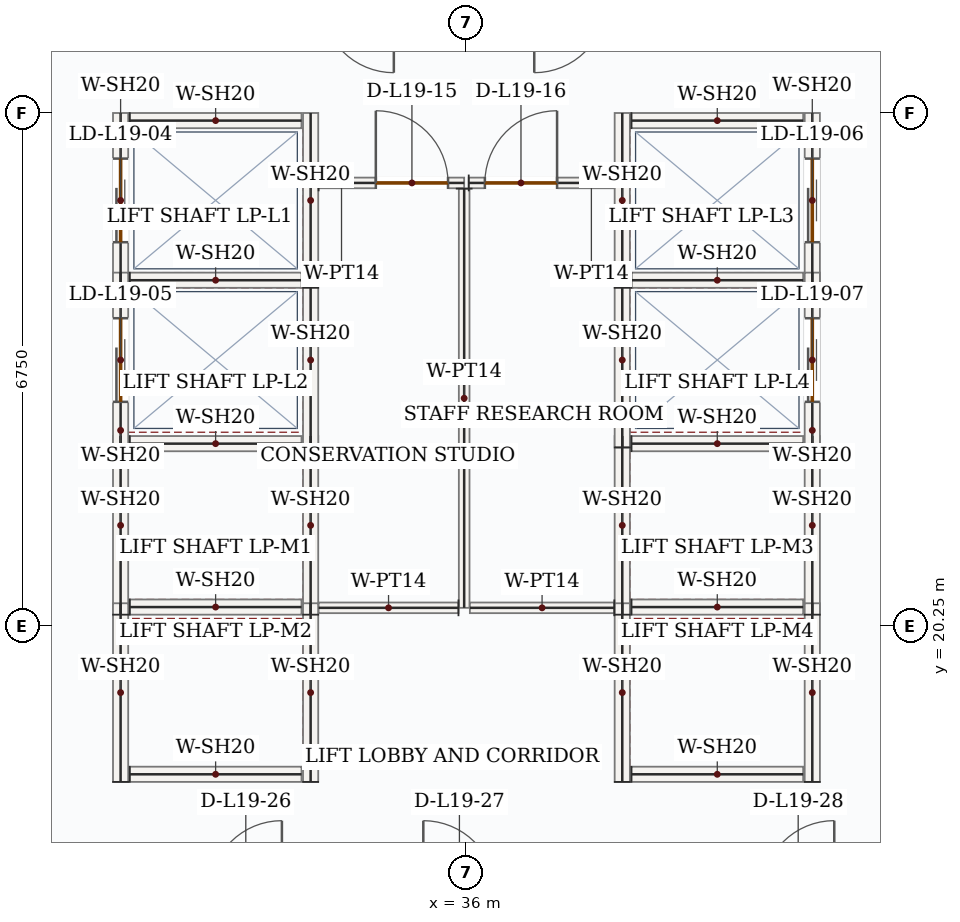
"""IFC4 building model, lengths in metres.
Left out: names, types, materials, properties, quantities, classifications, styles, units other than length and angle.
Written with IfcOpenShell. Run it as: python <this file> out.ifc"""

import sys

from ifc_helpers import new_model, si_unit, direction, frame, frame_2d, origin, place, context, subcontext, project, spatial, rectangle, extrude, source, transform, mapped, element, fill, save


model = new_model("IFC4")
c1 = context("Model", 3, precision=1e-05, world=origin(), true_north=direction((0.0, 1.0)))
c2 = subcontext(c1, "Body", "Model", "MODEL_VIEW")
j1 = project(units=[si_unit("LENGTHUNIT", "METRE"), si_unit("PLANEANGLEUNIT", "RADIAN")], contexts=[c1])
p1 = place(None, origin())
s1 = spatial("IfcSite", under=j1, at=p1, CompositionType="ELEMENT")
p2 = place(p1, origin())
s2 = spatial("IfcBuilding", under=s1, at=p2, CompositionType="ELEMENT")
p3 = place(p2, frame((0.0, 0.0, 87.9)))
s3 = spatial("IfcBuildingStorey", under=s2, at=p3, CompositionType="ELEMENT", Elevation=87.9)
m1 = source(origin(), c2, "Body", "SweptSolid", [
    extrude(rectangle(XDim=2.35, YDim=0.2, at=frame_2d((1.175, 0.0))), origin(), (0.0, 0.0, 1.0), 3.95),
])
for number, where, z_axis, x_axis in (
    (1, (31.45, 20.4, 0.0), (0.0, 0.0, 1.0), (0.0, 1.0, 0.0)),
    (2, (33.95, 20.4, 0.0), (0.0, 0.0, 1.0), (0.0, 1.0, 0.0)),
):
    element("IfcWall", number, at=place(p3, frame(where, z_axis=z_axis, x_axis=x_axis)), inside=s3, PredefinedType="SOLIDWALL", context=c2, shape_type="MappedRepresentation", body=[
        mapped(m1, transform((0.0, 0.0, 0.0), x_axis=(1.0, 0.0, 0.0), y_axis=(0.0, 1.0, 0.0), z_axis=(0.0, 0.0, 1.0), scale=1.0)),
    ])
m2 = source(origin(), c2, "Body", "SweptSolid", [
    extrude(rectangle(XDim=2.26, YDim=0.2, at=frame_2d((1.13, 0.0))), origin(), (0.0, 0.0, 1.0), 3.95),
])
for number, where, z_axis, x_axis in (
    (3, (31.57, 20.5, 0.0), (0.0, 0.0, 1.0), (1.0, 0.0, 0.0)),
    (4, (31.57, 22.65, 0.0), (0.0, 0.0, 1.0), (1.0, 0.0, 0.0)),
):
    element("IfcWall", number, at=place(p3, frame(where, z_axis=z_axis, x_axis=x_axis)), inside=s3, PredefinedType="SOLIDWALL", context=c2, shape_type="MappedRepresentation", body=[
        mapped(m2, transform((0.0, 0.0, 0.0), x_axis=(1.0, 0.0, 0.0), y_axis=(0.0, 1.0, 0.0), z_axis=(0.0, 0.0, 1.0), scale=1.0)),
    ])
for number, where, z_axis, x_axis in (
    (5, (31.45, 18.2, 0.0), (0.0, 0.0, 1.0), (0.0, 1.0, 0.0)),
    (6, (33.95, 18.2, 0.0), (0.0, 0.0, 1.0), (0.0, 1.0, 0.0)),
):
    element("IfcWall", number, at=place(p3, frame(where, z_axis=z_axis, x_axis=x_axis)), inside=s3, PredefinedType="SOLIDWALL", context=c2, shape_type="MappedRepresentation", body=[
        mapped(m1, transform((0.0, 0.0, 0.0), x_axis=(1.0, 0.0, 0.0), y_axis=(0.0, 1.0, 0.0), z_axis=(0.0, 0.0, 1.0), scale=1.0)),
    ])
p4 = place(p3, frame((31.57, 18.3, 0.0), z_axis=(0.0, 0.0, 1.0), x_axis=(1.0, 0.0, 0.0)))
e7 = element("IfcWall", 7, at=p4, inside=s3, PredefinedType="SOLIDWALL", context=c2, shape_type="MappedRepresentation", body=[
    mapped(m2, transform((0.0, 0.0, 0.0), x_axis=(1.0, 0.0, 0.0), y_axis=(0.0, 1.0, 0.0), z_axis=(0.0, 0.0, 1.0), scale=1.0)),
])
for number, where, z_axis, x_axis in (
    (8, (38.05, 20.4, 0.0), (0.0, 0.0, 1.0), (0.0, 1.0, 0.0)),
    (9, (40.55, 20.4, 0.0), (0.0, 0.0, 1.0), (0.0, 1.0, 0.0)),
):
    element("IfcWall", number, at=place(p3, frame(where, z_axis=z_axis, x_axis=x_axis)), inside=s3, PredefinedType="SOLIDWALL", context=c2, shape_type="MappedRepresentation", body=[
        mapped(m1, transform((0.0, 0.0, 0.0), x_axis=(1.0, 0.0, 0.0), y_axis=(0.0, 1.0, 0.0), z_axis=(0.0, 0.0, 1.0), scale=1.0)),
    ])
for number, where, z_axis, x_axis in (
    (10, (38.17, 20.5, 0.0), (0.0, 0.0, 1.0), (1.0, 0.0, 0.0)),
    (11, (38.17, 22.65, 0.0), (0.0, 0.0, 1.0), (1.0, 0.0, 0.0)),
):
    element("IfcWall", number, at=place(p3, frame(where, z_axis=z_axis, x_axis=x_axis)), inside=s3, PredefinedType="SOLIDWALL", context=c2, shape_type="MappedRepresentation", body=[
        mapped(m2, transform((0.0, 0.0, 0.0), x_axis=(1.0, 0.0, 0.0), y_axis=(0.0, 1.0, 0.0), z_axis=(0.0, 0.0, 1.0), scale=1.0)),
    ])
for number, where, z_axis, x_axis in (
    (12, (38.05, 18.2, 0.0), (0.0, 0.0, 1.0), (0.0, 1.0, 0.0)),
    (13, (40.55, 18.2, 0.0), (0.0, 0.0, 1.0), (0.0, 1.0, 0.0)),
):
    element("IfcWall", number, at=place(p3, frame(where, z_axis=z_axis, x_axis=x_axis)), inside=s3, PredefinedType="SOLIDWALL", context=c2, shape_type="MappedRepresentation", body=[
        mapped(m1, transform((0.0, 0.0, 0.0), x_axis=(1.0, 0.0, 0.0), y_axis=(0.0, 1.0, 0.0), z_axis=(0.0, 0.0, 1.0), scale=1.0)),
    ])
p5 = place(p3, frame((38.17, 18.3, 0.0), z_axis=(0.0, 0.0, 1.0), x_axis=(1.0, 0.0, 0.0)))
e14 = element("IfcWall", 14, at=p5, inside=s3, PredefinedType="SOLIDWALL", context=c2, shape_type="MappedRepresentation", body=[
    mapped(m2, transform((0.0, 0.0, 0.0), x_axis=(1.0, 0.0, 0.0), y_axis=(0.0, 1.0, 0.0), z_axis=(0.0, 0.0, 1.0), scale=1.0)),
])
p6 = place(p3, frame((31.45, 24.7, 0.0), z_axis=(0.0, 0.0, 1.0), x_axis=(0.0, 1.0, 0.0)))
e15 = element("IfcWall", 15, at=p6, inside=s3, PredefinedType="SOLIDWALL", context=c2, shape_type="SweptSolid", body=[
    extrude(rectangle(XDim=2.3, YDim=0.2, at=frame_2d((1.15, 0.0))), origin(), (0.0, 0.0, 1.0), 3.95),
])
p7 = place(p6, frame((0.6, 0.0, 0.0)))
e16 = element("IfcOpeningElement", 16, at=p7, cuts=e15, PredefinedType="OPENING", context=c2, shape_type="SweptSolid", body=[
    extrude(rectangle(XDim=1.1, YDim=2.15, at=frame_2d((0.55, 1.075))), frame((0.0, 0.11, 0.0), z_axis=(0.0, -1.0, 0.0), x_axis=(1.0, 0.0, 0.0)), (0.0, 0.0, 1.0), 0.22),
])
m3 = source(origin(), c2, "Body", "SweptSolid", [
    extrude(rectangle(XDim=2.3, YDim=0.2, at=frame_2d((1.15, 0.0))), origin(), (0.0, 0.0, 1.0), 3.95),
])
p8 = place(p3, frame((33.95, 24.7, 0.0), z_axis=(0.0, 0.0, 1.0), x_axis=(0.0, 1.0, 0.0)))
e17 = element("IfcWall", 17, at=p8, inside=s3, PredefinedType="SOLIDWALL", context=c2, shape_type="MappedRepresentation", body=[
    mapped(m3, transform((0.0, 0.0, 0.0), x_axis=(1.0, 0.0, 0.0), y_axis=(0.0, 1.0, 0.0), z_axis=(0.0, 0.0, 1.0), scale=1.0)),
])
for number, where, z_axis, x_axis in (
    (18, (31.57, 24.8, 0.0), (0.0, 0.0, 1.0), (1.0, 0.0, 0.0)),
    (19, (31.57, 26.9, 0.0), (0.0, 0.0, 1.0), (1.0, 0.0, 0.0)),
):
    element("IfcWall", number, at=place(p3, frame(where, z_axis=z_axis, x_axis=x_axis)), inside=s3, PredefinedType="SOLIDWALL", context=c2, shape_type="MappedRepresentation", body=[
        mapped(m2, transform((0.0, 0.0, 0.0), x_axis=(1.0, 0.0, 0.0), y_axis=(0.0, 1.0, 0.0), z_axis=(0.0, 0.0, 1.0), scale=1.0)),
    ])
p9 = place(p3, frame((31.45, 22.6, 0.0), z_axis=(0.0, 0.0, 1.0), x_axis=(0.0, 1.0, 0.0)))
e20 = element("IfcWall", 20, at=p9, inside=s3, PredefinedType="SOLIDWALL", context=c2, shape_type="SweptSolid", body=[
    extrude(rectangle(XDim=2.3, YDim=0.2, at=frame_2d((1.15, 0.0))), origin(), (0.0, 0.0, 1.0), 3.95),
])
p10 = place(p9, frame((0.6, 0.0, 0.0)))
e21 = element("IfcOpeningElement", 21, at=p10, cuts=e20, PredefinedType="OPENING", context=c2, shape_type="SweptSolid", body=[
    extrude(rectangle(XDim=1.1, YDim=2.15, at=frame_2d((0.55, 1.075))), frame((0.0, 0.11, 0.0), z_axis=(0.0, -1.0, 0.0), x_axis=(1.0, 0.0, 0.0)), (0.0, 0.0, 1.0), 0.22),
])
m4 = source(origin(), c2, "Body", "SweptSolid", [
    extrude(rectangle(XDim=2.3, YDim=0.2, at=frame_2d((1.15, 0.0))), origin(), (0.0, 0.0, 1.0), 3.95),
])
p11 = place(p3, frame((33.95, 22.6, 0.0), z_axis=(0.0, 0.0, 1.0), x_axis=(0.0, 1.0, 0.0)))
e22 = element("IfcWall", 22, at=p11, inside=s3, PredefinedType="SOLIDWALL", context=c2, shape_type="MappedRepresentation", body=[
    mapped(m4, transform((0.0, 0.0, 0.0), x_axis=(1.0, 0.0, 0.0), y_axis=(0.0, 1.0, 0.0), z_axis=(0.0, 0.0, 1.0), scale=1.0)),
])
p12 = place(p3, frame((38.05, 24.7, 0.0), z_axis=(0.0, 0.0, 1.0), x_axis=(0.0, 1.0, 0.0)))
e23 = element("IfcWall", 23, at=p12, inside=s3, PredefinedType="SOLIDWALL", context=c2, shape_type="MappedRepresentation", body=[
    mapped(m3, transform((0.0, 0.0, 0.0), x_axis=(1.0, 0.0, 0.0), y_axis=(0.0, 1.0, 0.0), z_axis=(0.0, 0.0, 1.0), scale=1.0)),
])
p13 = place(p3, frame((40.55, 24.7, 0.0), z_axis=(0.0, 0.0, 1.0), x_axis=(0.0, 1.0, 0.0)))
e24 = element("IfcWall", 24, at=p13, inside=s3, PredefinedType="SOLIDWALL", context=c2, shape_type="SweptSolid", body=[
    extrude(rectangle(XDim=2.3, YDim=0.2, at=frame_2d((1.15, 0.0))), origin(), (0.0, 0.0, 1.0), 3.95),
])
p14 = place(p13, frame((0.6, 0.0, 0.0)))
e25 = element("IfcOpeningElement", 25, at=p14, cuts=e24, PredefinedType="OPENING", context=c2, shape_type="SweptSolid", body=[
    extrude(rectangle(XDim=1.1, YDim=2.15, at=frame_2d((0.55, 1.075))), frame((0.0, 0.11, 0.0), z_axis=(0.0, -1.0, 0.0), x_axis=(1.0, 0.0, 0.0)), (0.0, 0.0, 1.0), 0.22),
])
for number, where, z_axis, x_axis in (
    (26, (38.17, 24.8, 0.0), (0.0, 0.0, 1.0), (1.0, 0.0, 0.0)),
    (27, (38.17, 26.9, 0.0), (0.0, 0.0, 1.0), (1.0, 0.0, 0.0)),
):
    element("IfcWall", number, at=place(p3, frame(where, z_axis=z_axis, x_axis=x_axis)), inside=s3, PredefinedType="SOLIDWALL", context=c2, shape_type="MappedRepresentation", body=[
        mapped(m2, transform((0.0, 0.0, 0.0), x_axis=(1.0, 0.0, 0.0), y_axis=(0.0, 1.0, 0.0), z_axis=(0.0, 0.0, 1.0), scale=1.0)),
    ])
p15 = place(p3, frame((38.05, 22.6, 0.0), z_axis=(0.0, 0.0, 1.0), x_axis=(0.0, 1.0, 0.0)))
e28 = element("IfcWall", 28, at=p15, inside=s3, PredefinedType="SOLIDWALL", context=c2, shape_type="MappedRepresentation", body=[
    mapped(m4, transform((0.0, 0.0, 0.0), x_axis=(1.0, 0.0, 0.0), y_axis=(0.0, 1.0, 0.0), z_axis=(0.0, 0.0, 1.0), scale=1.0)),
])
p16 = place(p3, frame((40.55, 22.6, 0.0), z_axis=(0.0, 0.0, 1.0), x_axis=(0.0, 1.0, 0.0)))
e29 = element("IfcWall", 29, at=p16, inside=s3, PredefinedType="SOLIDWALL", context=c2, shape_type="SweptSolid", body=[
    extrude(rectangle(XDim=2.3, YDim=0.2, at=frame_2d((1.15, 0.0))), origin(), (0.0, 0.0, 1.0), 3.95),
])
p17 = place(p16, frame((0.6, 0.0, 0.0)))
e30 = element("IfcOpeningElement", 30, at=p17, cuts=e29, PredefinedType="OPENING", context=c2, shape_type="SweptSolid", body=[
    extrude(rectangle(XDim=1.1, YDim=2.15, at=frame_2d((0.55, 1.075))), frame((0.0, 0.11, 0.0), z_axis=(0.0, -1.0, 0.0), x_axis=(1.0, 0.0, 0.0)), (0.0, 0.0, 1.0), 0.22),
])
p18 = place(p3, frame((34.055, 26.08, 0.0), z_axis=(0.0, 0.0, 1.0), x_axis=(1.0, 0.0, 0.0)))
e31 = element("IfcWall", 31, at=p18, inside=s3, PredefinedType="PARTITIONING", context=c2, shape_type="SweptSolid", body=[
    extrude(rectangle(XDim=1.915, YDim=0.14, at=frame_2d((0.958, 0.0))), origin(), (0.0, 0.0, 1.0), 3.95),
])
p19 = place(p18, frame((0.753, 0.0, 0.0)))
e32 = element("IfcOpeningElement", 32, at=p19, cuts=e31, PredefinedType="OPENING", context=c2, shape_type="SweptSolid", body=[
    extrude(rectangle(XDim=0.95, YDim=2.15, at=frame_2d((0.475, 1.075))), frame((0.0, 0.08, 0.0), z_axis=(0.0, -1.0, 0.0), x_axis=(1.0, 0.0, 0.0)), (0.0, 0.0, 1.0), 0.16),
])
m5 = source(origin(), c2, "Body", "SweptSolid", [
    extrude(rectangle(XDim=5.515, YDim=0.14, at=frame_2d((2.757, 0.0))), origin(), (0.0, 0.0, 1.0), 3.95),
])
p20 = place(p3, frame((35.97, 26.005, 0.0), z_axis=(0.0, 0.0, 1.0), x_axis=(0.0, -1.0, 0.0)))
e33 = element("IfcWall", 33, at=p20, inside=s3, PredefinedType="PARTITIONING", context=c2, shape_type="MappedRepresentation", body=[
    mapped(m5, transform((0.0, 0.0, 0.0), x_axis=(1.0, 0.0, 0.0), y_axis=(0.0, 1.0, 0.0), z_axis=(0.0, 0.0, 1.0), scale=1.0)),
])
m6 = source(origin(), c2, "Body", "SweptSolid", [
    extrude(rectangle(XDim=1.84, YDim=0.14, at=frame_2d((0.92, 0.0))), origin(), (0.0, 0.0, 1.0), 3.95),
])
p21 = place(p3, frame((35.895, 20.49, 0.0), z_axis=(0.0, 0.0, 1.0), x_axis=(-1.0, 0.0, 0.0)))
e34 = element("IfcWall", 34, at=p21, inside=s3, PredefinedType="PARTITIONING", context=c2, shape_type="MappedRepresentation", body=[
    mapped(m6, transform((0.0, 0.0, 0.0), x_axis=(1.0, 0.0, 0.0), y_axis=(0.0, 1.0, 0.0), z_axis=(0.0, 0.0, 1.0), scale=1.0)),
])
p22 = place(p3, frame((36.03, 26.08, 0.0), z_axis=(0.0, 0.0, 1.0), x_axis=(1.0, 0.0, 0.0)))
e35 = element("IfcWall", 35, at=p22, inside=s3, PredefinedType="PARTITIONING", context=c2, shape_type="SweptSolid", body=[
    extrude(rectangle(XDim=1.915, YDim=0.14, at=frame_2d((0.958, 0.0))), origin(), (0.0, 0.0, 1.0), 3.95),
])
p23 = place(p22, frame((0.212, 0.0, 0.0)))
e36 = element("IfcOpeningElement", 36, at=p23, cuts=e35, PredefinedType="OPENING", context=c2, shape_type="SweptSolid", body=[
    extrude(rectangle(XDim=0.95, YDim=2.15, at=frame_2d((0.475, 1.075))), frame((0.0, 0.08, 0.0), z_axis=(0.0, -1.0, 0.0), x_axis=(1.0, 0.0, 0.0)), (0.0, 0.0, 1.0), 0.16),
])
m7 = source(origin(), c2, "Body", "SweptSolid", [
    extrude(rectangle(XDim=1.9, YDim=0.14, at=frame_2d((0.95, 0.0))), origin(), (0.0, 0.0, 1.0), 3.95),
])
p24 = place(p3, frame((37.945, 20.49, 0.0), z_axis=(0.0, 0.0, 1.0), x_axis=(-1.0, 0.0, 0.0)))
e37 = element("IfcWall", 37, at=p24, inside=s3, PredefinedType="PARTITIONING", context=c2, shape_type="MappedRepresentation", body=[
    mapped(m7, transform((0.0, 0.0, 0.0), x_axis=(1.0, 0.0, 0.0), y_axis=(0.0, 1.0, 0.0), z_axis=(0.0, 0.0, 1.0), scale=1.0)),
])
m8 = source(origin(), c2, "Body", "SweptSolid", [
    extrude(rectangle(XDim=1.1, YDim=2.15, at=frame_2d((0.55, 1.075))), frame((0.0, 0.025, 0.0), z_axis=(0.0, -1.0, 0.0), x_axis=(1.0, 0.0, 0.0)), (0.0, 0.0, 1.0), 0.05),
])
p25 = place(p7, origin())
e38 = element("IfcDoor", 38, at=p25, inside=s3, OperationType="DOUBLE_DOOR_SLIDING", PredefinedType="DOOR", context=c2, shape_type="MappedRepresentation", body=[
    mapped(m8, transform((0.0, 0.0, 0.0), x_axis=(1.0, 0.0, 0.0), y_axis=(0.0, 1.0, 0.0), z_axis=(0.0, 0.0, 1.0), scale=1.0)),
])
fill(e16, e38)
p26 = place(p10, origin())
e39 = element("IfcDoor", 39, at=p26, inside=s3, OperationType="DOUBLE_DOOR_SLIDING", PredefinedType="DOOR", context=c2, shape_type="MappedRepresentation", body=[
    mapped(m8, transform((0.0, 0.0, 0.0), x_axis=(1.0, 0.0, 0.0), y_axis=(0.0, 1.0, 0.0), z_axis=(0.0, 0.0, 1.0), scale=1.0)),
])
fill(e21, e39)
p27 = place(p14, origin())
e40 = element("IfcDoor", 40, at=p27, inside=s3, OperationType="DOUBLE_DOOR_SLIDING", PredefinedType="DOOR", context=c2, shape_type="MappedRepresentation", body=[
    mapped(m8, transform((0.0, 0.0, 0.0), x_axis=(1.0, 0.0, 0.0), y_axis=(0.0, 1.0, 0.0), z_axis=(0.0, 0.0, 1.0), scale=1.0)),
])
fill(e25, e40)
p28 = place(p17, origin())
e41 = element("IfcDoor", 41, at=p28, inside=s3, OperationType="DOUBLE_DOOR_SLIDING", PredefinedType="DOOR", context=c2, shape_type="MappedRepresentation", body=[
    mapped(m8, transform((0.0, 0.0, 0.0), x_axis=(1.0, 0.0, 0.0), y_axis=(0.0, 1.0, 0.0), z_axis=(0.0, 0.0, 1.0), scale=1.0)),
])
fill(e30, e41)
m9 = source(origin(), c2, "Body", "SweptSolid", [
    extrude(rectangle(XDim=0.95, YDim=2.15, at=frame_2d((0.475, 1.075))), frame((0.0, 0.025, 0.0), z_axis=(0.0, -1.0, 0.0), x_axis=(1.0, 0.0, 0.0)), (0.0, 0.0, 1.0), 0.05),
])
p29 = place(p19, origin())
e42 = element("IfcDoor", 42, at=p29, inside=s3, OperationType="SINGLE_SWING_LEFT", PredefinedType="DOOR", context=c2, shape_type="MappedRepresentation", body=[
    mapped(m9, transform((0.0, 0.0, 0.0), x_axis=(1.0, 0.0, 0.0), y_axis=(0.0, 1.0, 0.0), z_axis=(0.0, 0.0, 1.0), scale=1.0)),
])
fill(e32, e42)
p30 = place(p23, origin())
e43 = element("IfcDoor", 43, at=p30, inside=s3, OperationType="SINGLE_SWING_RIGHT", PredefinedType="DOOR", context=c2, shape_type="MappedRepresentation", body=[
    mapped(m9, transform((0.0, 0.0, 0.0), x_axis=(1.0, 0.0, 0.0), y_axis=(0.0, 1.0, 0.0), z_axis=(0.0, 0.0, 1.0), scale=1.0)),
])
fill(e36, e43)
save(model, sys.argv[1])
